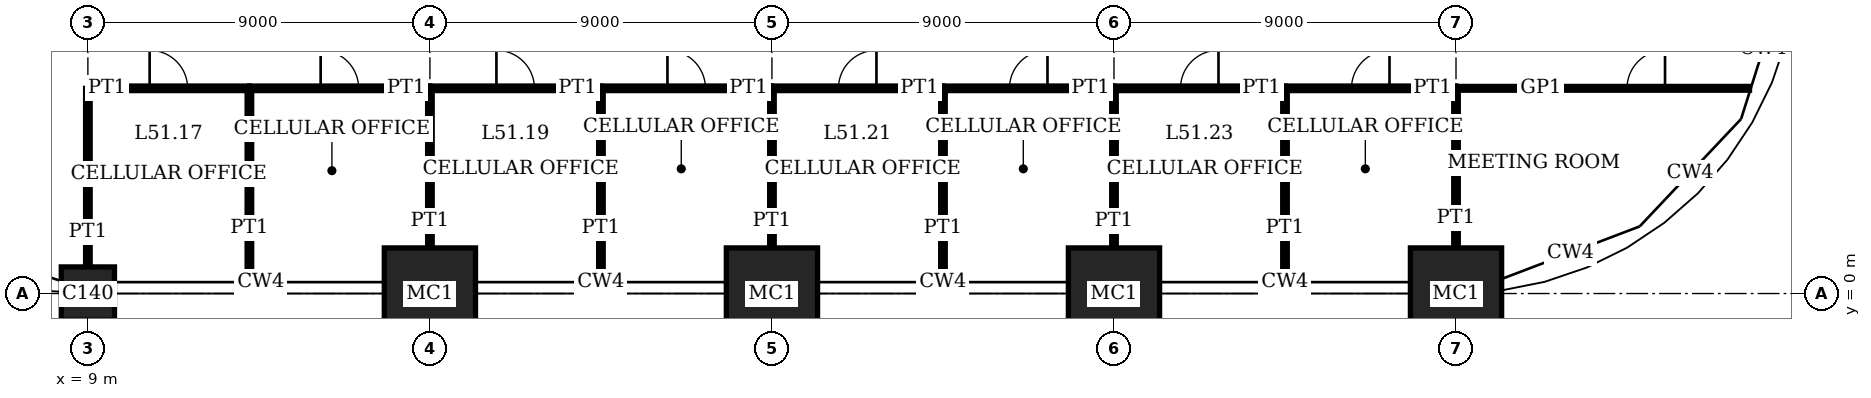
"""IFC4 building model, lengths in metres.
Left out: names, types, materials, properties, quantities, classifications, styles, units other than length and angle.
Written with IfcOpenShell. Run it as: python <this file> out.ifc"""

import sys

from ifc_helpers import new_model, si_unit, direction, frame, frame_2d, origin, origin_2d, place, context, subcontext, project, spatial, rectangle, extrude, element, fill, save


model = new_model("IFC4")
c1 = context("Model", 3, precision=1e-05, world=origin(), true_north=direction((0.0, 1.0)))
c2 = subcontext(c1, "Body", "Model", "MODEL_VIEW")
j1 = project(units=[si_unit("LENGTHUNIT", "METRE"), si_unit("PLANEANGLEUNIT", "RADIAN")], contexts=[c1])
p1 = place(None, origin())
s1 = spatial("IfcSite", under=j1, at=p1, CompositionType="ELEMENT")
p2 = place(p1, origin())
s2 = spatial("IfcBuilding", under=s1, at=p2, CompositionType="ELEMENT")
p3 = place(p2, frame((0.0, 0.0, 210.2)))
s3 = spatial("IfcBuildingStorey", under=s2, at=p3, CompositionType="ELEMENT", Elevation=210.2)
p4 = place(p3, frame((9.0, 0.0, 0.0), z_axis=(0.0, 0.0, 1.0), x_axis=(1.0, 0.0, 0.0)))
e1 = element("IfcColumn", 1, at=p4, inside=s3, PredefinedType="COLUMN", context=c2, shape_type="SweptSolid", body=[
    extrude(rectangle(XDim=1.4, YDim=1.4, at=origin_2d()), origin(), (0.0, 0.0, 1.0), 4.0),
])
for number, where, z_axis, x_axis in (
    (2, (18.0, 0.0, 0.0), (0.0, 0.0, 1.0), (1.0, 0.0, 0.0)),
    (3, (27.0, 0.0, 0.0), (0.0, 0.0, 1.0), (1.0, 0.0, 0.0)),
    (4, (36.0, 0.0, 0.0), (0.0, 0.0, 1.0), (1.0, 0.0, 0.0)),
    (5, (45.0, 0.0, 0.0), (0.0, 0.0, 1.0), (1.0, 0.0, 0.0)),
):
    element("IfcColumn", number, at=place(p3, frame(where, z_axis=z_axis, x_axis=x_axis)), inside=s3, PredefinedType="COLUMN", context=c2, shape_type="SweptSolid", body=[
        extrude(rectangle(XDim=2.4, YDim=2.4, at=origin_2d()), origin(), (0.0, 0.0, 1.0), 4.0),
    ])
p5 = place(p3, frame((9.0, 5.4, 0.0), z_axis=(0.0, 0.0, 1.0), x_axis=(1.0, 0.0, 0.0)))
e6 = element("IfcWall", 6, at=p5, inside=s3, PredefinedType="PARTITIONING", context=c2, shape_type="SweptSolid", body=[
    extrude(rectangle(XDim=4.25, YDim=0.12, at=frame_2d((2.125, 0.0))), origin(), (0.0, 0.0, 1.0), 3.75),
])
p6 = place(p5, frame((1.625, 0.0, 0.0)))
e7 = element("IfcOpeningElement", 7, at=p6, cuts=e6, PredefinedType="OPENING", context=c2, shape_type="SweptSolid", body=[
    extrude(rectangle(XDim=1.0, YDim=2.4, at=frame_2d((0.5, 1.2))), frame((0.0, 0.07, 0.0), z_axis=(0.0, -1.0, 0.0), x_axis=(1.0, 0.0, 0.0)), (0.0, 0.0, 1.0), 0.14),
])
p7 = place(p3, frame((13.25, 5.4, 0.0), z_axis=(0.0, 0.0, 1.0), x_axis=(1.0, 0.0, 0.0)))
e8 = element("IfcWall", 8, at=p7, inside=s3, PredefinedType="PARTITIONING", context=c2, shape_type="SweptSolid", body=[
    extrude(rectangle(XDim=4.75, YDim=0.12, at=frame_2d((2.375, 0.0))), origin(), (0.0, 0.0, 1.0), 3.75),
])
p8 = place(p7, frame((1.875, 0.0, 0.0)))
e9 = element("IfcOpeningElement", 9, at=p8, cuts=e8, PredefinedType="OPENING", context=c2, shape_type="SweptSolid", body=[
    extrude(rectangle(XDim=1.0, YDim=2.4, at=frame_2d((0.5, 1.2))), frame((0.0, 0.07, 0.0), z_axis=(0.0, -1.0, 0.0), x_axis=(1.0, 0.0, 0.0)), (0.0, 0.0, 1.0), 0.14),
])
p9 = place(p3, frame((18.0, 5.4, 0.0), z_axis=(0.0, 0.0, 1.0), x_axis=(1.0, 0.0, 0.0)))
e10 = element("IfcWall", 10, at=p9, inside=s3, PredefinedType="PARTITIONING", context=c2, shape_type="SweptSolid", body=[
    extrude(rectangle(XDim=4.5, YDim=0.12, at=frame_2d((2.25, 0.0))), origin(), (0.0, 0.0, 1.0), 3.75),
])
p10 = place(p9, frame((1.75, 0.0, 0.0)))
e11 = element("IfcOpeningElement", 11, at=p10, cuts=e10, PredefinedType="OPENING", context=c2, shape_type="SweptSolid", body=[
    extrude(rectangle(XDim=1.0, YDim=2.4, at=frame_2d((0.5, 1.2))), frame((0.0, 0.07, 0.0), z_axis=(0.0, -1.0, 0.0), x_axis=(1.0, 0.0, 0.0)), (0.0, 0.0, 1.0), 0.14),
])
p11 = place(p3, frame((22.5, 5.4, 0.0), z_axis=(0.0, 0.0, 1.0), x_axis=(1.0, 0.0, 0.0)))
e12 = element("IfcWall", 12, at=p11, inside=s3, PredefinedType="PARTITIONING", context=c2, shape_type="SweptSolid", body=[
    extrude(rectangle(XDim=4.5, YDim=0.12, at=frame_2d((2.25, 0.0))), origin(), (0.0, 0.0, 1.0), 3.75),
])
p12 = place(p11, frame((1.75, 0.0, 0.0)))
e13 = element("IfcOpeningElement", 13, at=p12, cuts=e12, PredefinedType="OPENING", context=c2, shape_type="SweptSolid", body=[
    extrude(rectangle(XDim=1.0, YDim=2.4, at=frame_2d((0.5, 1.2))), frame((0.0, 0.07, 0.0), z_axis=(0.0, -1.0, 0.0), x_axis=(1.0, 0.0, 0.0)), (0.0, 0.0, 1.0), 0.14),
])
p13 = place(p3, frame((27.0, 5.4, 0.0), z_axis=(0.0, 0.0, 1.0), x_axis=(1.0, 0.0, 0.0)))
e14 = element("IfcWall", 14, at=p13, inside=s3, PredefinedType="PARTITIONING", context=c2, shape_type="SweptSolid", body=[
    extrude(rectangle(XDim=4.5, YDim=0.12, at=frame_2d((2.25, 0.0))), origin(), (0.0, 0.0, 1.0), 3.75),
])
p14 = place(p13, frame((1.75, 0.0, 0.0)))
e15 = element("IfcOpeningElement", 15, at=p14, cuts=e14, PredefinedType="OPENING", context=c2, shape_type="SweptSolid", body=[
    extrude(rectangle(XDim=1.0, YDim=2.4, at=frame_2d((0.5, 1.2))), frame((0.0, 0.07, 0.0), z_axis=(0.0, -1.0, 0.0), x_axis=(1.0, 0.0, 0.0)), (0.0, 0.0, 1.0), 0.14),
])
p15 = place(p3, frame((31.5, 5.4, 0.0), z_axis=(0.0, 0.0, 1.0), x_axis=(1.0, 0.0, 0.0)))
e16 = element("IfcWall", 16, at=p15, inside=s3, PredefinedType="PARTITIONING", context=c2, shape_type="SweptSolid", body=[
    extrude(rectangle(XDim=4.5, YDim=0.12, at=frame_2d((2.25, 0.0))), origin(), (0.0, 0.0, 1.0), 3.75),
])
p16 = place(p15, frame((1.75, 0.0, 0.0)))
e17 = element("IfcOpeningElement", 17, at=p16, cuts=e16, PredefinedType="OPENING", context=c2, shape_type="SweptSolid", body=[
    extrude(rectangle(XDim=1.0, YDim=2.4, at=frame_2d((0.5, 1.2))), frame((0.0, 0.07, 0.0), z_axis=(0.0, -1.0, 0.0), x_axis=(1.0, 0.0, 0.0)), (0.0, 0.0, 1.0), 0.14),
])
p17 = place(p3, frame((36.0, 5.4, 0.0), z_axis=(0.0, 0.0, 1.0), x_axis=(1.0, 0.0, 0.0)))
e18 = element("IfcWall", 18, at=p17, inside=s3, PredefinedType="PARTITIONING", context=c2, shape_type="SweptSolid", body=[
    extrude(rectangle(XDim=4.5, YDim=0.12, at=frame_2d((2.25, 0.0))), origin(), (0.0, 0.0, 1.0), 3.75),
])
p18 = place(p17, frame((1.75, 0.0, 0.0)))
e19 = element("IfcOpeningElement", 19, at=p18, cuts=e18, PredefinedType="OPENING", context=c2, shape_type="SweptSolid", body=[
    extrude(rectangle(XDim=1.0, YDim=2.4, at=frame_2d((0.5, 1.2))), frame((0.0, 0.07, 0.0), z_axis=(0.0, -1.0, 0.0), x_axis=(1.0, 0.0, 0.0)), (0.0, 0.0, 1.0), 0.14),
])
p19 = place(p3, frame((40.5, 5.4, 0.0), z_axis=(0.0, 0.0, 1.0), x_axis=(1.0, 0.0, 0.0)))
e20 = element("IfcWall", 20, at=p19, inside=s3, PredefinedType="PARTITIONING", context=c2, shape_type="SweptSolid", body=[
    extrude(rectangle(XDim=4.5, YDim=0.12, at=frame_2d((2.25, 0.0))), origin(), (0.0, 0.0, 1.0), 3.75),
])
p20 = place(p19, frame((1.75, 0.0, 0.0)))
e21 = element("IfcOpeningElement", 21, at=p20, cuts=e20, PredefinedType="OPENING", context=c2, shape_type="SweptSolid", body=[
    extrude(rectangle(XDim=1.0, YDim=2.4, at=frame_2d((0.5, 1.2))), frame((0.0, 0.07, 0.0), z_axis=(0.0, -1.0, 0.0), x_axis=(1.0, 0.0, 0.0)), (0.0, 0.0, 1.0), 0.14),
])
p21 = place(p3, frame((45.0, 5.4, 0.0), z_axis=(0.0, 0.0, 1.0), x_axis=(1.0, 0.0, 0.0)))
e22 = element("IfcWall", 22, at=p21, inside=s3, PredefinedType="PARTITIONING", context=c2, shape_type="SweptSolid", body=[
    extrude(rectangle(XDim=7.723, YDim=0.1, at=frame_2d((3.862, 0.0))), origin(), (0.0, 0.0, 1.0), 3.75),
])
p22 = place(p21, frame((4.5, 0.0, 0.0)))
e23 = element("IfcOpeningElement", 23, at=p22, cuts=e22, PredefinedType="OPENING", context=c2, shape_type="SweptSolid", body=[
    extrude(rectangle(XDim=1.0, YDim=2.4, at=frame_2d((0.5, 1.2))), frame((0.0, 0.06, 0.0), z_axis=(0.0, -1.0, 0.0), x_axis=(1.0, 0.0, 0.0)), (0.0, 0.0, 1.0), 0.12),
])
p23 = place(p3, frame((9.0, 0.7, 0.0), z_axis=(0.0, 0.0, 1.0), x_axis=(0.0, 1.0, 0.0)))
e24 = element("IfcWall", 24, at=p23, inside=s3, PredefinedType="PARTITIONING", context=c2, shape_type="SweptSolid", body=[
    extrude(rectangle(XDim=4.7, YDim=0.12, at=frame_2d((2.35, 0.0))), origin(), (0.0, 0.0, 1.0), 3.05),
])
p24 = place(p3, frame((13.25, 0.31, 0.0), z_axis=(0.0, 0.0, 1.0), x_axis=(0.0, 1.0, 0.0)))
e25 = element("IfcWall", 25, at=p24, inside=s3, PredefinedType="PARTITIONING", context=c2, shape_type="SweptSolid", body=[
    extrude(rectangle(XDim=5.09, YDim=0.12, at=frame_2d((2.545, 0.0))), origin(), (0.0, 0.0, 1.0), 3.75),
])
p25 = place(p3, frame((18.0, 1.2, 0.0), z_axis=(0.0, 0.0, 1.0), x_axis=(0.0, 1.0, 0.0)))
e26 = element("IfcWall", 26, at=p25, inside=s3, PredefinedType="PARTITIONING", context=c2, shape_type="SweptSolid", body=[
    extrude(rectangle(XDim=4.2, YDim=0.12, at=frame_2d((2.1, 0.0))), origin(), (0.0, 0.0, 1.0), 3.05),
])
p26 = place(p3, frame((22.5, 0.31, 0.0), z_axis=(0.0, 0.0, 1.0), x_axis=(0.0, 1.0, 0.0)))
e27 = element("IfcWall", 27, at=p26, inside=s3, PredefinedType="PARTITIONING", context=c2, shape_type="SweptSolid", body=[
    extrude(rectangle(XDim=5.09, YDim=0.12, at=frame_2d((2.545, 0.0))), origin(), (0.0, 0.0, 1.0), 3.75),
])
p27 = place(p3, frame((27.0, 1.2, 0.0), z_axis=(0.0, 0.0, 1.0), x_axis=(0.0, 1.0, 0.0)))
e28 = element("IfcWall", 28, at=p27, inside=s3, PredefinedType="PARTITIONING", context=c2, shape_type="SweptSolid", body=[
    extrude(rectangle(XDim=4.2, YDim=0.12, at=frame_2d((2.1, 0.0))), origin(), (0.0, 0.0, 1.0), 3.05),
])
p28 = place(p3, frame((31.5, 0.31, 0.0), z_axis=(0.0, 0.0, 1.0), x_axis=(0.0, 1.0, 0.0)))
e29 = element("IfcWall", 29, at=p28, inside=s3, PredefinedType="PARTITIONING", context=c2, shape_type="SweptSolid", body=[
    extrude(rectangle(XDim=5.09, YDim=0.12, at=frame_2d((2.545, 0.0))), origin(), (0.0, 0.0, 1.0), 3.75),
])
p29 = place(p3, frame((36.0, 1.2, 0.0), z_axis=(0.0, 0.0, 1.0), x_axis=(0.0, 1.0, 0.0)))
e30 = element("IfcWall", 30, at=p29, inside=s3, PredefinedType="PARTITIONING", context=c2, shape_type="SweptSolid", body=[
    extrude(rectangle(XDim=4.2, YDim=0.12, at=frame_2d((2.1, 0.0))), origin(), (0.0, 0.0, 1.0), 3.05),
])
p30 = place(p3, frame((40.5, 0.31, 0.0), z_axis=(0.0, 0.0, 1.0), x_axis=(0.0, 1.0, 0.0)))
e31 = element("IfcWall", 31, at=p30, inside=s3, PredefinedType="PARTITIONING", context=c2, shape_type="SweptSolid", body=[
    extrude(rectangle(XDim=5.09, YDim=0.12, at=frame_2d((2.545, 0.0))), origin(), (0.0, 0.0, 1.0), 3.75),
])
p31 = place(p3, frame((45.0, 1.2, 0.0), z_axis=(0.0, 0.0, 1.0), x_axis=(0.0, 1.0, 0.0)))
e32 = element("IfcWall", 32, at=p31, inside=s3, PredefinedType="PARTITIONING", context=c2, shape_type="SweptSolid", body=[
    extrude(rectangle(XDim=4.2, YDim=0.12, at=frame_2d((2.1, 0.0))), origin(), (0.0, 0.0, 1.0), 3.05),
])
p32 = place(p6, origin())
e33 = element("IfcDoor", 33, at=p32, inside=s3, OperationType="SINGLE_SWING_RIGHT", PredefinedType="DOOR", context=c2, shape_type="SweptSolid", body=[
    extrude(rectangle(XDim=1.0, YDim=2.4, at=frame_2d((0.5, 1.2))), frame((0.0, 0.025, 0.0), z_axis=(0.0, -1.0, 0.0), x_axis=(1.0, 0.0, 0.0)), (0.0, 0.0, 1.0), 0.05),
])
fill(e7, e33)
p33 = place(p8, origin())
e34 = element("IfcDoor", 34, at=p33, inside=s3, OperationType="SINGLE_SWING_RIGHT", PredefinedType="DOOR", context=c2, shape_type="SweptSolid", body=[
    extrude(rectangle(XDim=1.0, YDim=2.4, at=frame_2d((0.5, 1.2))), frame((0.0, 0.025, 0.0), z_axis=(0.0, -1.0, 0.0), x_axis=(1.0, 0.0, 0.0)), (0.0, 0.0, 1.0), 0.05),
])
fill(e9, e34)
p34 = place(p10, origin())
e35 = element("IfcDoor", 35, at=p34, inside=s3, OperationType="SINGLE_SWING_RIGHT", PredefinedType="DOOR", context=c2, shape_type="SweptSolid", body=[
    extrude(rectangle(XDim=1.0, YDim=2.4, at=frame_2d((0.5, 1.2))), frame((0.0, 0.025, 0.0), z_axis=(0.0, -1.0, 0.0), x_axis=(1.0, 0.0, 0.0)), (0.0, 0.0, 1.0), 0.05),
])
fill(e11, e35)
p35 = place(p12, origin())
e36 = element("IfcDoor", 36, at=p35, inside=s3, OperationType="SINGLE_SWING_RIGHT", PredefinedType="DOOR", context=c2, shape_type="SweptSolid", body=[
    extrude(rectangle(XDim=1.0, YDim=2.4, at=frame_2d((0.5, 1.2))), frame((0.0, 0.025, 0.0), z_axis=(0.0, -1.0, 0.0), x_axis=(1.0, 0.0, 0.0)), (0.0, 0.0, 1.0), 0.05),
])
fill(e13, e36)
p36 = place(p14, origin())
e37 = element("IfcDoor", 37, at=p36, inside=s3, OperationType="SINGLE_SWING_LEFT", PredefinedType="DOOR", context=c2, shape_type="SweptSolid", body=[
    extrude(rectangle(XDim=1.0, YDim=2.4, at=frame_2d((0.5, 1.2))), frame((0.0, 0.025, 0.0), z_axis=(0.0, -1.0, 0.0), x_axis=(1.0, 0.0, 0.0)), (0.0, 0.0, 1.0), 0.05),
])
fill(e15, e37)
p37 = place(p16, origin())
e38 = element("IfcDoor", 38, at=p37, inside=s3, OperationType="SINGLE_SWING_LEFT", PredefinedType="DOOR", context=c2, shape_type="SweptSolid", body=[
    extrude(rectangle(XDim=1.0, YDim=2.4, at=frame_2d((0.5, 1.2))), frame((0.0, 0.025, 0.0), z_axis=(0.0, -1.0, 0.0), x_axis=(1.0, 0.0, 0.0)), (0.0, 0.0, 1.0), 0.05),
])
fill(e17, e38)
p38 = place(p18, origin())
e39 = element("IfcDoor", 39, at=p38, inside=s3, OperationType="SINGLE_SWING_LEFT", PredefinedType="DOOR", context=c2, shape_type="SweptSolid", body=[
    extrude(rectangle(XDim=1.0, YDim=2.4, at=frame_2d((0.5, 1.2))), frame((0.0, 0.025, 0.0), z_axis=(0.0, -1.0, 0.0), x_axis=(1.0, 0.0, 0.0)), (0.0, 0.0, 1.0), 0.05),
])
fill(e19, e39)
p39 = place(p20, origin())
e40 = element("IfcDoor", 40, at=p39, inside=s3, OperationType="SINGLE_SWING_LEFT", PredefinedType="DOOR", context=c2, shape_type="SweptSolid", body=[
    extrude(rectangle(XDim=1.0, YDim=2.4, at=frame_2d((0.5, 1.2))), frame((0.0, 0.025, 0.0), z_axis=(0.0, -1.0, 0.0), x_axis=(1.0, 0.0, 0.0)), (0.0, 0.0, 1.0), 0.05),
])
fill(e21, e40)
p40 = place(p22, origin())
e41 = element("IfcDoor", 41, at=p40, inside=s3, OperationType="SINGLE_SWING_LEFT", PredefinedType="DOOR", context=c2, shape_type="SweptSolid", body=[
    extrude(rectangle(XDim=1.0, YDim=2.4, at=frame_2d((0.5, 1.2))), frame((0.0, 0.02, 0.0), z_axis=(0.0, -1.0, 0.0), x_axis=(1.0, 0.0, 0.0)), (0.0, 0.0, 1.0), 0.04),
])
fill(e23, e41)
save(model, sys.argv[1])
